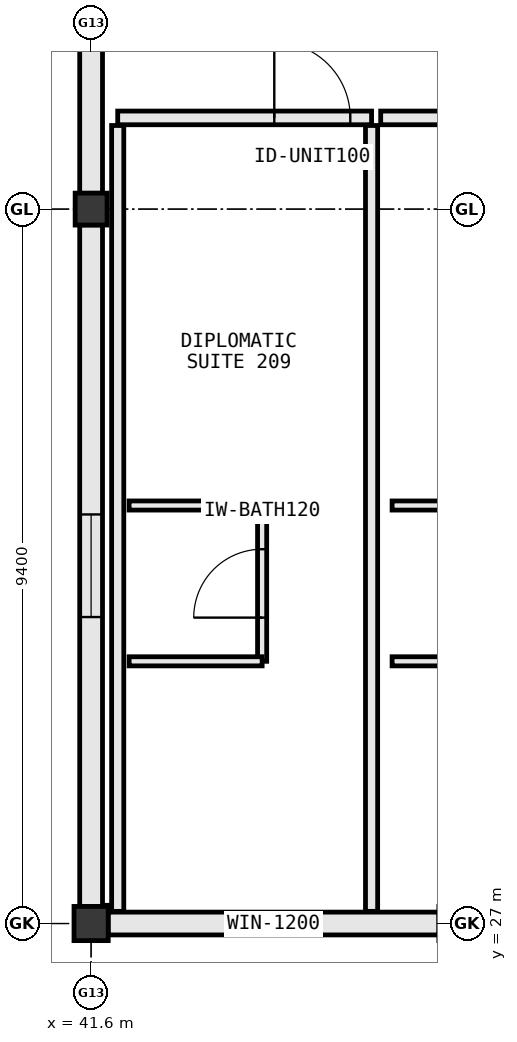
"""IFC4 building model, lengths in metres.
Left out: names, types, materials, properties, quantities, classifications, styles, units other than length and angle.
Written with IfcOpenShell. Run it as: python <this file> out.ifc"""

import sys

from ifc_helpers import new_model, si_unit, direction, frame, frame_2d, origin, origin_2d, place, context, subcontext, project, spatial, rectangle, extrude, element, fill, save


model = new_model("IFC4")
c1 = context("Model", 3, precision=1e-05, world=origin(), true_north=direction((0.0, 1.0)))
c2 = subcontext(c1, "Body", "Model", "MODEL_VIEW")
j1 = project(units=[si_unit("LENGTHUNIT", "METRE"), si_unit("PLANEANGLEUNIT", "RADIAN")], contexts=[c1])
p1 = place(None, origin())
s1 = spatial("IfcSite", under=j1, at=p1, CompositionType="ELEMENT")
p2 = place(p1, origin())
s2 = spatial("IfcBuilding", under=s1, at=p2, CompositionType="ELEMENT")
p3 = place(p2, frame((0.0, 0.0, 27.6)))
s3 = spatial("IfcBuildingStorey", under=s2, at=p3, CompositionType="ELEMENT", Elevation=27.6)
p4 = place(p3, frame((41.6, 27.0, 0.0), z_axis=(0.0, 0.0, 1.0), x_axis=(1.0, 0.0, 0.0)))
e1 = element("IfcColumn", 1, at=p4, inside=s3, PredefinedType="COLUMN", context=c2, shape_type="SweptSolid", body=[
    extrude(rectangle(XDim=0.45, YDim=0.45, at=origin_2d()), origin(), (0.0, 0.0, 1.0), 3.8),
])
p5 = place(p3, frame((41.6, 36.4, 0.0), z_axis=(0.0, 0.0, 1.0), x_axis=(1.0, 0.0, 0.0)))
e2 = element("IfcColumn", 2, at=p5, inside=s3, PredefinedType="COLUMN", context=c2, shape_type="SweptSolid", body=[
    extrude(rectangle(XDim=0.42, YDim=0.42, at=origin_2d()), origin(), (0.0, 0.0, 1.0), 3.8),
])
p6 = place(p3, frame((41.6, 46.992, 0.0), z_axis=(0.0, 0.0, 1.0), x_axis=(0.0, -1.0, 0.0)))
e3 = element("IfcWall", 3, at=p6, inside=s3, PredefinedType="STANDARD", context=c2, shape_type="SweptSolid", body=[
    extrude(rectangle(XDim=10.384, YDim=0.3, at=frame_2d((5.192, 0.0))), origin(), (0.0, 0.0, 1.0), 2.91),
])
p7 = place(p6, frame((1.921, 0.0, 0.85)))
e4 = element("IfcOpeningElement", 4, at=p7, cuts=e3, PredefinedType="OPENING", context=c2, shape_type="SweptSolid", body=[
    extrude(rectangle(XDim=1.35, YDim=1.65, at=frame_2d((0.675, 0.825))), frame((0.0, 0.162, 0.0), z_axis=(0.0, -1.0, 0.0), x_axis=(1.0, 0.0, 0.0)), (0.0, 0.0, 1.0), 0.324),
])
p8 = place(p6, frame((7.113, 0.0, 0.85)))
e5 = element("IfcOpeningElement", 5, at=p8, cuts=e3, PredefinedType="OPENING", context=c2, shape_type="SweptSolid", body=[
    extrude(rectangle(XDim=1.35, YDim=1.65, at=frame_2d((0.675, 0.825))), frame((0.0, 0.162, 0.0), z_axis=(0.0, -1.0, 0.0), x_axis=(1.0, 0.0, 0.0)), (0.0, 0.0, 1.0), 0.324),
])
p9 = place(p3, frame((41.6, 36.192, 0.0), z_axis=(0.0, 0.0, 1.0), x_axis=(0.0, -1.0, 0.0)))
e6 = element("IfcWall", 6, at=p9, inside=s3, PredefinedType="STANDARD", context=c2, shape_type="SweptSolid", body=[
    extrude(rectangle(XDim=8.969, YDim=0.3, at=frame_2d((4.484, 0.0))), origin(), (0.0, 0.0, 1.0), 2.93),
])
p10 = place(p9, frame((3.81, 0.0, 0.85)))
e7 = element("IfcOpeningElement", 7, at=p10, cuts=e6, PredefinedType="OPENING", context=c2, shape_type="SweptSolid", body=[
    extrude(rectangle(XDim=1.35, YDim=1.65, at=frame_2d((0.675, 0.825))), frame((0.0, 0.162, 0.0), z_axis=(0.0, -1.0, 0.0), x_axis=(1.0, 0.0, 0.0)), (0.0, 0.0, 1.0), 0.324),
])
p11 = place(p3, frame((41.823, 27.0, 0.0), z_axis=(0.0, 0.0, 1.0), x_axis=(1.0, 0.0, 0.0)))
e8 = element("IfcWall", 8, at=p11, inside=s3, PredefinedType="STANDARD", context=c2, shape_type="SweptSolid", body=[
    extrude(rectangle(XDim=4.354, YDim=0.3, at=frame_2d((2.177, 0.0))), origin(), (0.0, 0.0, 1.0), 3.01),
])
p12 = place(p11, frame((1.577, 0.0, 0.85)))
e9 = element("IfcOpeningElement", 9, at=p12, cuts=e8, PredefinedType="OPENING", context=c2, shape_type="SweptSolid", body=[
    extrude(rectangle(XDim=1.2, YDim=1.55, at=frame_2d((0.6, 0.775))), frame((0.0, 0.162, 0.0), z_axis=(0.0, -1.0, 0.0), x_axis=(1.0, 0.0, 0.0)), (0.0, 0.0, 1.0), 0.324),
])
p13 = place(p3, frame((45.29, 37.6, 0.0), z_axis=(0.0, 0.0, 1.0), x_axis=(-1.0, 0.0, 0.0)))
e10 = element("IfcWall", 10, at=p13, inside=s3, PredefinedType="PARTITIONING", context=c2, shape_type="SweptSolid", body=[
    extrude(rectangle(XDim=3.34, YDim=0.18, at=frame_2d((1.67, 0.0))), origin(), (0.0, 0.0, 1.0), 3.555),
])
p14 = place(p13, frame((0.28, 0.0, 0.0)))
e11 = element("IfcOpeningElement", 11, at=p14, cuts=e10, PredefinedType="OPENING", context=c2, shape_type="SweptSolid", body=[
    extrude(rectangle(XDim=1.0, YDim=2.2, at=frame_2d((0.5, 1.1))), frame((0.0, 0.102, 0.0), z_axis=(0.0, -1.0, 0.0), x_axis=(1.0, 0.0, 0.0)), (0.0, 0.0, 1.0), 0.204),
])
p15 = place(p3, frame((41.95, 27.16, 0.0), z_axis=(0.0, 0.0, 1.0), x_axis=(0.0, 1.0, 0.0)))
e12 = element("IfcWall", 12, at=p15, inside=s3, PredefinedType="PARTITIONING", context=c2, shape_type="SweptSolid", body=[
    extrude(rectangle(XDim=10.34, YDim=0.16, at=frame_2d((5.17, 0.0))), origin(), (0.0, 0.0, 1.0), 2.91),
])
p16 = place(p3, frame((45.29, 27.16, 0.0), z_axis=(0.0, 0.0, 1.0), x_axis=(0.0, 1.0, 0.0)))
e13 = element("IfcWall", 13, at=p16, inside=s3, PredefinedType="PARTITIONING", context=c2, shape_type="SweptSolid", body=[
    extrude(rectangle(XDim=10.34, YDim=0.16, at=frame_2d((5.17, 0.0))), origin(), (0.0, 0.0, 1.0), 3.555),
])
p17 = place(p3, frame((42.1, 32.5, 0.0), z_axis=(0.0, 0.0, 1.0), x_axis=(1.0, 0.0, 0.0)))
e14 = element("IfcWall", 14, at=p17, inside=s3, PredefinedType="PARTITIONING", context=c2, shape_type="SweptSolid", body=[
    extrude(rectangle(XDim=1.75, YDim=0.12, at=frame_2d((0.875, 0.0))), origin(), (0.0, 0.0, 1.0), 3.555),
])
p18 = place(p3, frame((43.85, 30.45, 0.0), z_axis=(0.0, 0.0, 1.0), x_axis=(0.0, 1.0, 0.0)))
e15 = element("IfcWall", 15, at=p18, inside=s3, PredefinedType="PARTITIONING", context=c2, shape_type="SweptSolid", body=[
    extrude(rectangle(XDim=2.05, YDim=0.12, at=frame_2d((1.025, 0.0))), origin(), (0.0, 0.0, 1.0), 3.1),
])
p19 = place(p18, frame((0.575, 0.0, 0.0)))
e16 = element("IfcOpeningElement", 16, at=p19, cuts=e15, PredefinedType="OPENING", context=c2, shape_type="SweptSolid", body=[
    extrude(rectangle(XDim=0.9, YDim=2.15, at=frame_2d((0.45, 1.075))), frame((0.0, 0.072, 0.0), z_axis=(0.0, -1.0, 0.0), x_axis=(1.0, 0.0, 0.0)), (0.0, 0.0, 1.0), 0.144),
])
p20 = place(p3, frame((42.1, 30.45, 0.0), z_axis=(0.0, 0.0, 1.0), x_axis=(1.0, 0.0, 0.0)))
e17 = element("IfcWall", 17, at=p20, inside=s3, PredefinedType="PARTITIONING", context=c2, shape_type="SweptSolid", body=[
    extrude(rectangle(XDim=1.75, YDim=0.12, at=frame_2d((0.875, 0.0))), origin(), (0.0, 0.0, 1.0), 3.555),
])
p21 = place(p3, frame((48.75, 37.6, 0.0), z_axis=(0.0, 0.0, 1.0), x_axis=(-1.0, 0.0, 0.0)))
e18 = element("IfcWall", 18, at=p21, inside=s3, PredefinedType="PARTITIONING", context=c2, shape_type="SweptSolid", body=[
    extrude(rectangle(XDim=3.34, YDim=0.18, at=frame_2d((1.67, 0.0))), origin(), (0.0, 0.0, 1.0), 3.555),
])
p22 = place(p21, frame((0.28, 0.0, 0.0)))
e19 = element("IfcOpeningElement", 19, at=p22, cuts=e18, PredefinedType="OPENING", context=c2, shape_type="SweptSolid", body=[
    extrude(rectangle(XDim=1.0, YDim=2.2, at=frame_2d((0.5, 1.1))), frame((0.0, 0.102, 0.0), z_axis=(0.0, -1.0, 0.0), x_axis=(1.0, 0.0, 0.0)), (0.0, 0.0, 1.0), 0.204),
])
for number, where, z_axis, x_axis in (
    (20, (45.56, 32.5, 0.0), (0.0, 0.0, 1.0), (1.0, 0.0, 0.0)),
    (21, (45.56, 30.45, 0.0), (0.0, 0.0, 1.0), (1.0, 0.0, 0.0)),
):
    element("IfcWall", number, at=place(p3, frame(where, z_axis=z_axis, x_axis=x_axis)), inside=s3, PredefinedType="PARTITIONING", context=c2, shape_type="SweptSolid", body=[
        extrude(rectangle(XDim=1.75, YDim=0.12, at=frame_2d((0.875, 0.0))), origin(), (0.0, 0.0, 1.0), 3.555),
    ])
p23 = place(p10, origin())
e22 = element("IfcWindow", 22, at=p23, inside=s3, PartitioningType="SINGLE_PANEL", PredefinedType="WINDOW", context=c2, shape_type="SweptSolid", body=[
    extrude(rectangle(XDim=1.35, YDim=1.65, at=frame_2d((0.675, 0.825))), frame((0.0, 0.03, 0.0), z_axis=(0.0, -1.0, 0.0), x_axis=(1.0, 0.0, 0.0)), (0.0, 0.0, 1.0), 0.06),
])
fill(e7, e22)
p24 = place(p12, origin())
e23 = element("IfcWindow", 23, at=p24, inside=s3, PartitioningType="SINGLE_PANEL", PredefinedType="WINDOW", context=c2, shape_type="SweptSolid", body=[
    extrude(rectangle(XDim=1.2, YDim=1.55, at=frame_2d((0.6, 0.775))), frame((0.0, 0.03, 0.0), z_axis=(0.0, -1.0, 0.0), x_axis=(1.0, 0.0, 0.0)), (0.0, 0.0, 1.0), 0.06),
])
fill(e9, e23)
p25 = place(p14, frame((1.0, 0.0, 0.0), z_axis=(0.0, 0.0, 1.0), x_axis=(-1.0, 0.0, 0.0)))
e24 = element("IfcDoor", 24, at=p25, inside=s3, OperationType="SINGLE_SWING_RIGHT", PredefinedType="DOOR", context=c2, shape_type="SweptSolid", body=[
    extrude(rectangle(XDim=1.0, YDim=2.2, at=frame_2d((0.5, 1.1))), frame((0.0, 0.025, 0.0), z_axis=(0.0, -1.0, 0.0), x_axis=(1.0, 0.0, 0.0)), (0.0, 0.0, 1.0), 0.05),
])
fill(e11, e24)
p26 = place(p19, origin())
e25 = element("IfcDoor", 25, at=p26, inside=s3, OperationType="SINGLE_SWING_LEFT", PredefinedType="DOOR", context=c2, shape_type="SweptSolid", body=[
    extrude(rectangle(XDim=0.9, YDim=2.15, at=frame_2d((0.45, 1.075))), frame((0.0, 0.025, 0.0), z_axis=(0.0, -1.0, 0.0), x_axis=(1.0, 0.0, 0.0)), (0.0, 0.0, 1.0), 0.05),
])
fill(e16, e25)
save(model, sys.argv[1])
